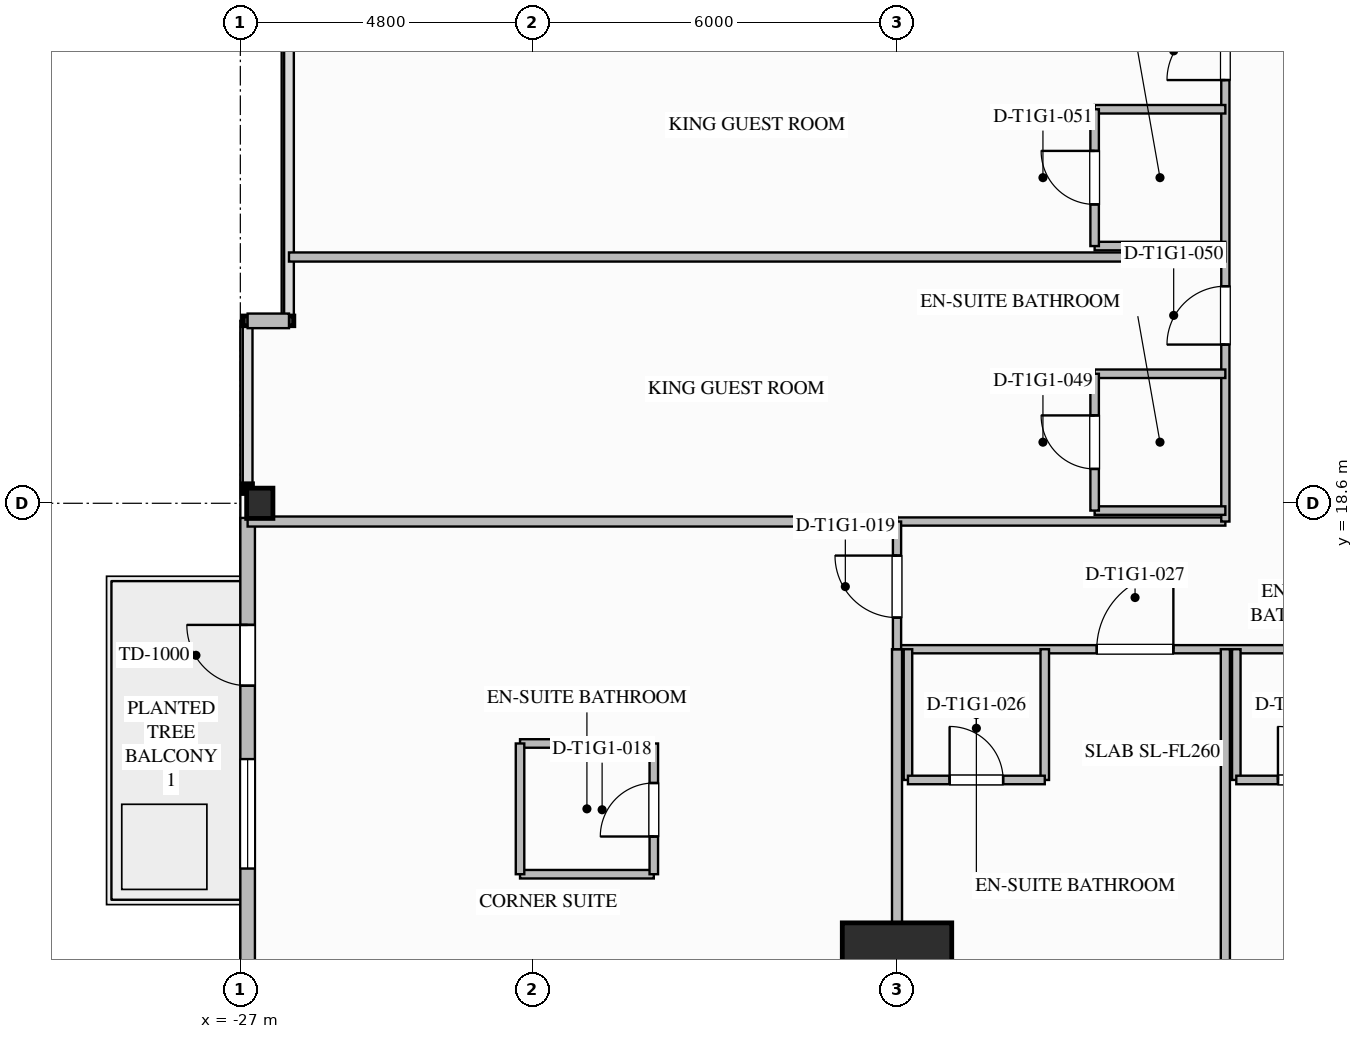
"""IFC4 building model, lengths in metres.
Left out: names, types, materials, properties, quantities, classifications, styles, units other than length and angle.
Written with IfcOpenShell. Run it as: python <this file> out.ifc"""

import sys

from ifc_helpers import new_model, si_unit, direction, frame, frame_2d, origin, origin_2d, place, context, subcontext, project, spatial, rectangle, i_section, extrude, element, fill, save


model = new_model("IFC4")
c1 = context("Model", 3, precision=1e-05, world=origin(), true_north=direction((0.0, 1.0)))
c2 = subcontext(c1, "Body", "Model", "MODEL_VIEW")
j1 = project(units=[si_unit("LENGTHUNIT", "METRE"), si_unit("PLANEANGLEUNIT", "RADIAN")], contexts=[c1])
p1 = place(None, origin())
s1 = spatial("IfcSite", under=j1, at=p1, CompositionType="ELEMENT")
p2 = place(p1, origin())
s2 = spatial("IfcBuilding", under=s1, at=p2, CompositionType="ELEMENT")
p3 = place(p2, frame((0.0, 0.0, 33.2)))
s3 = spatial("IfcBuildingStorey", under=s2, at=p3, CompositionType="ELEMENT", Elevation=33.2)
p4 = place(p3, frame((-16.2, 10.8, 0.0), z_axis=(0.0, 0.0, 1.0), x_axis=(1.0, 0.0, 0.0)))
e1 = element("IfcColumn", 1, at=p4, inside=s3, PredefinedType="COLUMN", context=c2, shape_type="SweptSolid", body=[
    extrude(rectangle(XDim=1.8, YDim=1.8, at=origin_2d()), origin(), (0.0, 0.0, 1.0), 3.5),
])
p5 = place(p3, frame((-26.68, 18.6, -0.26), z_axis=(0.0, 0.0, 1.0), x_axis=(1.0, 0.0, 0.0)))
e2 = element("IfcColumn", 2, at=p5, inside=s3, PredefinedType="COLUMN", context=c2, shape_type="SweptSolid", body=[
    extrude(i_section(OverallWidth=0.432, OverallDepth=0.498, WebThickness=0.056, FlangeThickness=0.089, FilletRadius=0.03, at=origin_2d()), origin(), (0.0, 0.0, 1.0), 3.757),
])
p6 = place(p3, frame((-26.88, 11.041, 0.0), z_axis=(0.0, 0.0, 1.0), x_axis=(0.0, 1.0, 0.0)))
e3 = element("IfcWall", 3, at=p6, inside=s3, PredefinedType="STANDARD", context=c2, shape_type="SweptSolid", body=[
    extrude(rectangle(XDim=7.318, YDim=0.24, at=frame_2d((3.659, 0.0))), origin(), (0.0, 0.0, 1.0), 2.629),
])
p7 = place(p6, frame((4.559, 0.0, 0.0)))
e4 = element("IfcOpeningElement", 4, at=p7, cuts=e3, PredefinedType="OPENING", context=c2, shape_type="SweptSolid", body=[
    extrude(rectangle(XDim=1.0, YDim=2.2, at=frame_2d((0.5, 1.1))), frame((0.0, 0.13, 0.0), z_axis=(0.0, -1.0, 0.0), x_axis=(1.0, 0.0, 0.0)), (0.0, 0.0, 1.0), 0.26),
])
p8 = place(p6, frame((1.552, 0.0, 0.75)))
e5 = element("IfcOpeningElement", 5, at=p8, cuts=e3, PredefinedType="OPENING", context=c2, shape_type="SweptSolid", body=[
    extrude(rectangle(XDim=1.8, YDim=1.779, at=frame_2d((0.9, 0.89))), frame((0.0, 0.13, 0.0), z_axis=(0.0, -1.0, 0.0), x_axis=(1.0, 0.0, 0.0)), (0.0, 0.0, 1.0), 0.26),
])
p9 = place(p3, frame((-26.88, 21.6, 0.0), z_axis=(0.0, 0.0, 1.0), x_axis=(1.0, 0.0, 0.0)))
e6 = element("IfcWall", 6, at=p9, inside=s3, PredefinedType="STANDARD", context=c2, shape_type="SweptSolid", body=[
    extrude(rectangle(XDim=0.68, YDim=0.24, at=frame_2d((0.34, 0.0))), origin(), (0.0, 0.0, 1.0), 3.24),
])
p10 = place(p3, frame((-16.2, 16.2, 0.0), z_axis=(0.0, 0.0, 1.0), x_axis=(1.0, 0.0, 0.0)))
e7 = element("IfcWall", 7, at=p10, inside=s3, PredefinedType="PARTITIONING", context=c2, shape_type="SweptSolid", body=[
    extrude(rectangle(XDim=32.4, YDim=0.135, at=frame_2d((16.2, 0.0))), origin(), (0.0, 0.0, 1.0), 3.24),
])
p11 = place(p10, frame((3.285, 0.0, 0.0)))
e8 = element("IfcOpeningElement", 8, at=p11, cuts=e7, PredefinedType="OPENING", context=c2, shape_type="SweptSolid", body=[
    extrude(rectangle(XDim=1.26, YDim=2.2, at=frame_2d((0.63, 1.1))), frame((0.0, 0.077, 0.0), z_axis=(0.0, -1.0, 0.0), x_axis=(1.0, 0.0, 0.0)), (0.0, 0.0, 1.0), 0.155),
])
p12 = place(p10, frame((8.59, 0.0, 0.0)))
e9 = element("IfcOpeningElement", 9, at=p12, cuts=e7, PredefinedType="OPENING", context=c2, shape_type="SweptSolid", body=[
    extrude(rectangle(XDim=0.96, YDim=2.15, at=frame_2d((0.48, 1.075))), frame((0.0, 0.077, 0.0), z_axis=(0.0, -1.0, 0.0), x_axis=(1.0, 0.0, 0.0)), (0.0, 0.0, 1.0), 0.155),
])
p13 = place(p10, frame((13.84, 0.0, 0.0)))
e10 = element("IfcOpeningElement", 10, at=p13, cuts=e7, PredefinedType="OPENING", context=c2, shape_type="SweptSolid", body=[
    extrude(rectangle(XDim=1.26, YDim=2.2, at=frame_2d((0.63, 1.1))), frame((0.0, 0.077, 0.0), z_axis=(0.0, -1.0, 0.0), x_axis=(1.0, 0.0, 0.0)), (0.0, 0.0, 1.0), 0.155),
])
p14 = place(p10, frame((19.73, 0.0, 0.0)))
e11 = element("IfcOpeningElement", 11, at=p14, cuts=e7, PredefinedType="OPENING", context=c2, shape_type="SweptSolid", body=[
    extrude(rectangle(XDim=1.26, YDim=2.2, at=frame_2d((0.63, 1.1))), frame((0.0, 0.077, 0.0), z_axis=(0.0, -1.0, 0.0), x_axis=(1.0, 0.0, 0.0)), (0.0, 0.0, 1.0), 0.155),
])
p15 = place(p10, frame((25.281, 0.0, 0.0)))
e12 = element("IfcOpeningElement", 12, at=p15, cuts=e7, PredefinedType="OPENING", context=c2, shape_type="SweptSolid", body=[
    extrude(rectangle(XDim=0.96, YDim=2.15, at=frame_2d((0.48, 1.075))), frame((0.0, 0.077, 0.0), z_axis=(0.0, -1.0, 0.0), x_axis=(1.0, 0.0, 0.0)), (0.0, 0.0, 1.0), 0.155),
])
p16 = place(p10, frame((30.285, 0.0, 0.0)))
e13 = element("IfcOpeningElement", 13, at=p16, cuts=e7, PredefinedType="OPENING", context=c2, shape_type="SweptSolid", body=[
    extrude(rectangle(XDim=1.26, YDim=2.2, at=frame_2d((0.63, 1.1))), frame((0.0, 0.077, 0.0), z_axis=(0.0, -1.0, 0.0), x_axis=(1.0, 0.0, 0.0)), (0.0, 0.0, 1.0), 0.155),
])
p17 = place(p3, frame((-16.2, 18.3, 0.0), z_axis=(0.0, 0.0, 1.0), x_axis=(1.0, 0.0, 0.0)))
e14 = element("IfcWall", 14, at=p17, inside=s3, PredefinedType="PARTITIONING", context=c2, shape_type="SweptSolid", body=[
    extrude(rectangle(XDim=5.4, YDim=0.135, at=frame_2d((2.7, 0.0))), origin(), (0.0, 0.0, 1.0), 3.24),
])
p18 = place(p3, frame((-10.8, 18.3, 0.0), z_axis=(0.0, 0.0, 1.0), x_axis=(0.0, 1.0, 0.0)))
e15 = element("IfcWall", 15, at=p18, inside=s3, PredefinedType="PARTITIONING", context=c2, shape_type="SweptSolid", body=[
    extrude(rectangle(XDim=17.4, YDim=0.135, at=frame_2d((8.7, 0.0))), origin(), (0.0, 0.0, 1.0), 3.24),
])
p19 = place(p18, frame((2.91, 0.0, 0.0)))
e16 = element("IfcOpeningElement", 16, at=p19, cuts=e15, PredefinedType="OPENING", context=c2, shape_type="SweptSolid", body=[
    extrude(rectangle(XDim=0.96, YDim=2.15, at=frame_2d((0.48, 1.075))), frame((0.0, 0.077, 0.0), z_axis=(0.0, -1.0, 0.0), x_axis=(1.0, 0.0, 0.0)), (0.0, 0.0, 1.0), 0.155),
])
p20 = place(p18, frame((7.26, 0.0, 0.0)))
e17 = element("IfcOpeningElement", 17, at=p20, cuts=e15, PredefinedType="OPENING", context=c2, shape_type="SweptSolid", body=[
    extrude(rectangle(XDim=0.96, YDim=2.15, at=frame_2d((0.48, 1.075))), frame((0.0, 0.077, 0.0), z_axis=(0.0, -1.0, 0.0), x_axis=(1.0, 0.0, 0.0)), (0.0, 0.0, 1.0), 0.155),
])
p21 = place(p18, frame((11.61, 0.0, 0.0)))
e18 = element("IfcOpeningElement", 18, at=p21, cuts=e15, PredefinedType="OPENING", context=c2, shape_type="SweptSolid", body=[
    extrude(rectangle(XDim=0.96, YDim=2.15, at=frame_2d((0.48, 1.075))), frame((0.0, 0.077, 0.0), z_axis=(0.0, -1.0, 0.0), x_axis=(1.0, 0.0, 0.0)), (0.0, 0.0, 1.0), 0.155),
])
p22 = place(p18, frame((15.96, 0.0, 0.0)))
e19 = element("IfcOpeningElement", 19, at=p22, cuts=e15, PredefinedType="OPENING", context=c2, shape_type="SweptSolid", body=[
    extrude(rectangle(XDim=0.96, YDim=2.15, at=frame_2d((0.48, 1.075))), frame((0.0, 0.077, 0.0), z_axis=(0.0, -1.0, 0.0), x_axis=(1.0, 0.0, 0.0)), (0.0, 0.0, 1.0), 0.155),
])
p23 = place(p3, frame((-16.2, 0.12, 0.0), z_axis=(0.0, 0.0, 1.0), x_axis=(0.0, 1.0, 0.0)))
e20 = element("IfcWall", 20, at=p23, inside=s3, PredefinedType="PARTITIONING", context=c2, shape_type="SweptSolid", body=[
    extrude(rectangle(XDim=16.08, YDim=0.165, at=frame_2d((8.04, 0.0))), origin(), (0.0, 0.0, 1.0), 2.298),
])
p24 = place(p3, frame((-26.88, 18.3, 0.0), z_axis=(0.0, 0.0, 1.0), x_axis=(1.0, 0.0, 0.0)))
e21 = element("IfcWall", 21, at=p24, inside=s3, PredefinedType="PARTITIONING", context=c2, shape_type="SweptSolid", body=[
    extrude(rectangle(XDim=10.68, YDim=0.165, at=frame_2d((5.34, 0.0))), origin(), (0.0, 0.0, 1.0), 2.298),
])
p25 = place(p3, frame((-16.2, 16.2, 0.0), z_axis=(0.0, 0.0, 1.0), x_axis=(0.0, 1.0, 0.0)))
e22 = element("IfcWall", 22, at=p25, inside=s3, PredefinedType="PARTITIONING", context=c2, shape_type="SweptSolid", body=[
    extrude(rectangle(XDim=2.1, YDim=0.135, at=frame_2d((1.05, 0.0))), origin(), (0.0, 0.0, 1.0), 2.298),
])
p26 = place(p25, frame((0.52, 0.0, 0.0)))
e23 = element("IfcOpeningElement", 23, at=p26, cuts=e22, PredefinedType="OPENING", context=c2, shape_type="SweptSolid", body=[
    extrude(rectangle(XDim=1.02, YDim=2.15, at=frame_2d((0.51, 1.075))), frame((0.0, 0.077, 0.0), z_axis=(0.0, -1.0, 0.0), x_axis=(1.0, 0.0, 0.0)), (0.0, 0.0, 1.0), 0.155),
])
for number, where, z_axis, x_axis in (
    (24, (-22.4, 12.5, 0.0), (0.0, 0.0, 1.0), (1.0, 0.0, 0.0)),
    (25, (-22.4, 14.65, 0.0), (0.0, 0.0, 1.0), (1.0, 0.0, 0.0)),
):
    element("IfcWall", number, at=place(p3, frame(where, z_axis=z_axis, x_axis=x_axis)), inside=s3, PredefinedType="PLUMBINGWALL", context=c2, shape_type="SweptSolid", body=[
        extrude(rectangle(XDim=2.2, YDim=0.14, at=frame_2d((1.1, 0.0))), origin(), (0.0, 0.0, 1.0), 3.24),
    ])
p27 = place(p3, frame((-22.4, 12.5, 0.0), z_axis=(0.0, 0.0, 1.0), x_axis=(0.0, 1.0, 0.0)))
e26 = element("IfcWall", 26, at=p27, inside=s3, PredefinedType="PLUMBINGWALL", context=c2, shape_type="SweptSolid", body=[
    extrude(rectangle(XDim=2.15, YDim=0.14, at=frame_2d((1.075, 0.0))), origin(), (0.0, 0.0, 1.0), 3.24),
])
p28 = place(p3, frame((-20.2, 12.5, 0.0), z_axis=(0.0, 0.0, 1.0), x_axis=(0.0, 1.0, 0.0)))
e27 = element("IfcWall", 27, at=p28, inside=s3, PredefinedType="PLUMBINGWALL", context=c2, shape_type="SweptSolid", body=[
    extrude(rectangle(XDim=2.15, YDim=0.14, at=frame_2d((1.075, 0.0))), origin(), (0.0, 0.0, 1.0), 3.24),
])
p29 = place(p28, frame((0.62, 0.0, 0.0)))
e28 = element("IfcOpeningElement", 28, at=p29, cuts=e27, PredefinedType="OPENING", context=c2, shape_type="SweptSolid", body=[
    extrude(rectangle(XDim=0.88, YDim=2.1, at=frame_2d((0.44, 1.05))), frame((0.0, 0.08, 0.0), z_axis=(0.0, -1.0, 0.0), x_axis=(1.0, 0.0, 0.0)), (0.0, 0.0, 1.0), 0.16),
])
p30 = place(p3, frame((-16.02, 16.2, 0.0), z_axis=(0.0, 0.0, 1.0), x_axis=(0.0, -1.0, 0.0)))
e29 = element("IfcWall", 29, at=p30, inside=s3, PredefinedType="PLUMBINGWALL", context=c2, shape_type="SweptSolid", body=[
    extrude(rectangle(XDim=2.15, YDim=0.14, at=frame_2d((1.075, 0.0))), origin(), (0.0, 0.0, 1.0), 2.298),
])
p31 = place(p3, frame((-13.77, 16.2, 0.0), z_axis=(0.0, 0.0, 1.0), x_axis=(0.0, -1.0, 0.0)))
e30 = element("IfcWall", 30, at=p31, inside=s3, PredefinedType="PLUMBINGWALL", context=c2, shape_type="SweptSolid", body=[
    extrude(rectangle(XDim=2.15, YDim=0.14, at=frame_2d((1.075, 0.0))), origin(), (0.0, 0.0, 1.0), 3.24),
])
p32 = place(p3, frame((-16.02, 14.05, 0.0), z_axis=(0.0, 0.0, 1.0), x_axis=(1.0, 0.0, 0.0)))
e31 = element("IfcWall", 31, at=p32, inside=s3, PredefinedType="PLUMBINGWALL", context=c2, shape_type="SweptSolid", body=[
    extrude(rectangle(XDim=2.25, YDim=0.14, at=frame_2d((1.125, 0.0))), origin(), (0.0, 0.0, 1.0), 3.24),
])
p33 = place(p32, frame((0.685, 0.0, 0.0)))
e32 = element("IfcOpeningElement", 32, at=p33, cuts=e31, PredefinedType="OPENING", context=c2, shape_type="SweptSolid", body=[
    extrude(rectangle(XDim=0.88, YDim=2.1, at=frame_2d((0.44, 1.05))), frame((0.0, 0.08, 0.0), z_axis=(0.0, -1.0, 0.0), x_axis=(1.0, 0.0, 0.0)), (0.0, 0.0, 1.0), 0.16),
])
p34 = place(p3, frame((-10.8, 0.12, 0.0), z_axis=(0.0, 0.0, 1.0), x_axis=(0.0, 1.0, 0.0)))
e33 = element("IfcWall", 33, at=p34, inside=s3, PredefinedType="PARTITIONING", context=c2, shape_type="SweptSolid", body=[
    extrude(rectangle(XDim=16.08, YDim=0.15, at=frame_2d((8.04, 0.0))), origin(), (0.0, 0.0, 1.0), 3.24),
])
p35 = place(p3, frame((-10.62, 16.2, 0.0), z_axis=(0.0, 0.0, 1.0), x_axis=(0.0, -1.0, 0.0)))
e34 = element("IfcWall", 34, at=p35, inside=s3, PredefinedType="PLUMBINGWALL", context=c2, shape_type="SweptSolid", body=[
    extrude(rectangle(XDim=2.15, YDim=0.14, at=frame_2d((1.075, 0.0))), origin(), (0.0, 0.0, 1.0), 3.24),
])
p36 = place(p3, frame((-10.62, 14.05, 0.0), z_axis=(0.0, 0.0, 1.0), x_axis=(1.0, 0.0, 0.0)))
e35 = element("IfcWall", 35, at=p36, inside=s3, PredefinedType="PLUMBINGWALL", context=c2, shape_type="SweptSolid", body=[
    extrude(rectangle(XDim=2.25, YDim=0.14, at=frame_2d((1.125, 0.0))), origin(), (0.0, 0.0, 1.0), 3.24),
])
p37 = place(p36, frame((0.685, 0.0, 0.0)))
e36 = element("IfcOpeningElement", 36, at=p37, cuts=e35, PredefinedType="OPENING", context=c2, shape_type="SweptSolid", body=[
    extrude(rectangle(XDim=0.88, YDim=2.1, at=frame_2d((0.44, 1.05))), frame((0.0, 0.08, 0.0), z_axis=(0.0, -1.0, 0.0), x_axis=(1.0, 0.0, 0.0)), (0.0, 0.0, 1.0), 0.16),
])
p38 = place(p3, frame((-10.8, 18.48, 0.0), z_axis=(0.0, 0.0, 1.0), x_axis=(-1.0, 0.0, 0.0)))
e37 = element("IfcWall", 37, at=p38, inside=s3, PredefinedType="PLUMBINGWALL", context=c2, shape_type="SweptSolid", body=[
    extrude(rectangle(XDim=2.15, YDim=0.14, at=frame_2d((1.075, 0.0))), origin(), (0.0, 0.0, 1.0), 2.617),
])
p39 = place(p3, frame((-10.8, 20.73, 0.0), z_axis=(0.0, 0.0, 1.0), x_axis=(-1.0, 0.0, 0.0)))
e38 = element("IfcWall", 38, at=p39, inside=s3, PredefinedType="PLUMBINGWALL", context=c2, shape_type="SweptSolid", body=[
    extrude(rectangle(XDim=2.15, YDim=0.14, at=frame_2d((1.075, 0.0))), origin(), (0.0, 0.0, 1.0), 3.24),
])
p40 = place(p3, frame((-12.95, 18.48, 0.0), z_axis=(0.0, 0.0, 1.0), x_axis=(0.0, 1.0, 0.0)))
e39 = element("IfcWall", 39, at=p40, inside=s3, PredefinedType="PLUMBINGWALL", context=c2, shape_type="SweptSolid", body=[
    extrude(rectangle(XDim=2.25, YDim=0.14, at=frame_2d((1.125, 0.0))), origin(), (0.0, 0.0, 1.0), 3.24),
])
p41 = place(p40, frame((0.685, 0.0, 0.0)))
e40 = element("IfcOpeningElement", 40, at=p41, cuts=e39, PredefinedType="OPENING", context=c2, shape_type="SweptSolid", body=[
    extrude(rectangle(XDim=0.88, YDim=2.1, at=frame_2d((0.44, 1.05))), frame((0.0, 0.08, 0.0), z_axis=(0.0, -1.0, 0.0), x_axis=(1.0, 0.0, 0.0)), (0.0, 0.0, 1.0), 0.16),
])
p42 = place(p3, frame((-26.2, 22.65, 0.0), z_axis=(0.0, 0.0, 1.0), x_axis=(1.0, 0.0, 0.0)))
e41 = element("IfcWall", 41, at=p42, inside=s3, PredefinedType="PARTITIONING", context=c2, shape_type="SweptSolid", body=[
    extrude(rectangle(XDim=15.4, YDim=0.15, at=frame_2d((7.7, 0.0))), origin(), (0.0, 0.0, 1.0), 3.24),
])
for number, where, z_axis, x_axis in (
    (42, (-10.8, 22.83, 0.0), (0.0, 0.0, 1.0), (-1.0, 0.0, 0.0)),
    (43, (-10.8, 25.08, 0.0), (0.0, 0.0, 1.0), (-1.0, 0.0, 0.0)),
):
    element("IfcWall", number, at=place(p3, frame(where, z_axis=z_axis, x_axis=x_axis)), inside=s3, PredefinedType="PLUMBINGWALL", context=c2, shape_type="SweptSolid", body=[
        extrude(rectangle(XDim=2.15, YDim=0.14, at=frame_2d((1.075, 0.0))), origin(), (0.0, 0.0, 1.0), 3.24),
    ])
p43 = place(p3, frame((-12.95, 22.83, 0.0), z_axis=(0.0, 0.0, 1.0), x_axis=(0.0, 1.0, 0.0)))
e44 = element("IfcWall", 44, at=p43, inside=s3, PredefinedType="PLUMBINGWALL", context=c2, shape_type="SweptSolid", body=[
    extrude(rectangle(XDim=2.25, YDim=0.14, at=frame_2d((1.125, 0.0))), origin(), (0.0, 0.0, 1.0), 3.24),
])
p44 = place(p43, frame((0.685, 0.0, 0.0)))
e45 = element("IfcOpeningElement", 45, at=p44, cuts=e44, PredefinedType="OPENING", context=c2, shape_type="SweptSolid", body=[
    extrude(rectangle(XDim=0.88, YDim=2.1, at=frame_2d((0.44, 1.05))), frame((0.0, 0.08, 0.0), z_axis=(0.0, -1.0, 0.0), x_axis=(1.0, 0.0, 0.0)), (0.0, 0.0, 1.0), 0.16),
])
p45 = place(p7, origin())
e46 = element("IfcDoor", 46, at=p45, inside=s3, OperationType="SINGLE_SWING_RIGHT", PredefinedType="DOOR", context=c2, shape_type="SweptSolid", body=[
    extrude(rectangle(XDim=1.0, YDim=2.2, at=frame_2d((0.5, 1.1))), frame((0.0, 0.025, 0.0), z_axis=(0.0, -1.0, 0.0), x_axis=(1.0, 0.0, 0.0)), (0.0, 0.0, 1.0), 0.05),
])
fill(e4, e46)
p46 = place(p8, origin())
e47 = element("IfcWindow", 47, at=p46, inside=s3, PartitioningType="SINGLE_PANEL", PredefinedType="WINDOW", context=c2, shape_type="SweptSolid", body=[
    extrude(rectangle(XDim=1.8, YDim=1.779, at=frame_2d((0.9, 0.89))), frame((0.0, 0.03, 0.0), z_axis=(0.0, -1.0, 0.0), x_axis=(1.0, 0.0, 0.0)), (0.0, 0.0, 1.0), 0.06),
])
fill(e5, e47)
p47 = place(p29, origin())
e48 = element("IfcDoor", 48, at=p47, inside=s3, OperationType="SINGLE_SWING_LEFT", PredefinedType="DOOR", context=c2, shape_type="SweptSolid", body=[
    extrude(rectangle(XDim=0.88, YDim=2.1, at=frame_2d((0.44, 1.05))), frame((0.0, 0.025, 0.0), z_axis=(0.0, -1.0, 0.0), x_axis=(1.0, 0.0, 0.0)), (0.0, 0.0, 1.0), 0.05),
])
fill(e28, e48)
p48 = place(p26, origin())
e49 = element("IfcDoor", 49, at=p48, inside=s3, OperationType="SINGLE_SWING_RIGHT", PredefinedType="DOOR", context=c2, shape_type="SweptSolid", body=[
    extrude(rectangle(XDim=1.02, YDim=2.15, at=frame_2d((0.51, 1.075))), frame((0.0, 0.025, 0.0), z_axis=(0.0, -1.0, 0.0), x_axis=(1.0, 0.0, 0.0)), (0.0, 0.0, 1.0), 0.05),
])
fill(e23, e49)
p49 = place(p33, origin())
e50 = element("IfcDoor", 50, at=p49, inside=s3, OperationType="SINGLE_SWING_LEFT", PredefinedType="DOOR", context=c2, shape_type="SweptSolid", body=[
    extrude(rectangle(XDim=0.88, YDim=2.1, at=frame_2d((0.44, 1.05))), frame((0.0, 0.025, 0.0), z_axis=(0.0, -1.0, 0.0), x_axis=(1.0, 0.0, 0.0)), (0.0, 0.0, 1.0), 0.05),
])
fill(e32, e50)
p50 = place(p11, origin())
e51 = element("IfcDoor", 51, at=p50, inside=s3, OperationType="SINGLE_SWING_RIGHT", PredefinedType="DOOR", context=c2, shape_type="SweptSolid", body=[
    extrude(rectangle(XDim=1.26, YDim=2.2, at=frame_2d((0.63, 1.1))), frame((0.0, 0.025, 0.0), z_axis=(0.0, -1.0, 0.0), x_axis=(1.0, 0.0, 0.0)), (0.0, 0.0, 1.0), 0.05),
])
fill(e8, e51)
p51 = place(p37, origin())
e52 = element("IfcDoor", 52, at=p51, inside=s3, OperationType="SINGLE_SWING_LEFT", PredefinedType="DOOR", context=c2, shape_type="SweptSolid", body=[
    extrude(rectangle(XDim=0.88, YDim=2.1, at=frame_2d((0.44, 1.05))), frame((0.0, 0.025, 0.0), z_axis=(0.0, -1.0, 0.0), x_axis=(1.0, 0.0, 0.0)), (0.0, 0.0, 1.0), 0.05),
])
fill(e36, e52)
p52 = place(p41, origin())
e53 = element("IfcDoor", 53, at=p52, inside=s3, OperationType="SINGLE_SWING_RIGHT", PredefinedType="DOOR", context=c2, shape_type="SweptSolid", body=[
    extrude(rectangle(XDim=0.88, YDim=2.1, at=frame_2d((0.44, 1.05))), frame((0.0, 0.025, 0.0), z_axis=(0.0, -1.0, 0.0), x_axis=(1.0, 0.0, 0.0)), (0.0, 0.0, 1.0), 0.05),
])
fill(e40, e53)
p53 = place(p19, origin())
e54 = element("IfcDoor", 54, at=p53, inside=s3, OperationType="SINGLE_SWING_LEFT", PredefinedType="DOOR", context=c2, shape_type="SweptSolid", body=[
    extrude(rectangle(XDim=0.96, YDim=2.15, at=frame_2d((0.48, 1.075))), frame((0.0, 0.025, 0.0), z_axis=(0.0, -1.0, 0.0), x_axis=(1.0, 0.0, 0.0)), (0.0, 0.0, 1.0), 0.05),
])
fill(e16, e54)
p54 = place(p44, origin())
e55 = element("IfcDoor", 55, at=p54, inside=s3, OperationType="SINGLE_SWING_RIGHT", PredefinedType="DOOR", context=c2, shape_type="SweptSolid", body=[
    extrude(rectangle(XDim=0.88, YDim=2.1, at=frame_2d((0.44, 1.05))), frame((0.0, 0.025, 0.0), z_axis=(0.0, -1.0, 0.0), x_axis=(1.0, 0.0, 0.0)), (0.0, 0.0, 1.0), 0.05),
])
fill(e45, e55)
p55 = place(p20, origin())
e56 = element("IfcDoor", 56, at=p55, inside=s3, OperationType="SINGLE_SWING_LEFT", PredefinedType="DOOR", context=c2, shape_type="SweptSolid", body=[
    extrude(rectangle(XDim=0.96, YDim=2.15, at=frame_2d((0.48, 1.075))), frame((0.0, 0.025, 0.0), z_axis=(0.0, -1.0, 0.0), x_axis=(1.0, 0.0, 0.0)), (0.0, 0.0, 1.0), 0.05),
])
fill(e17, e56)
save(model, sys.argv[1])
